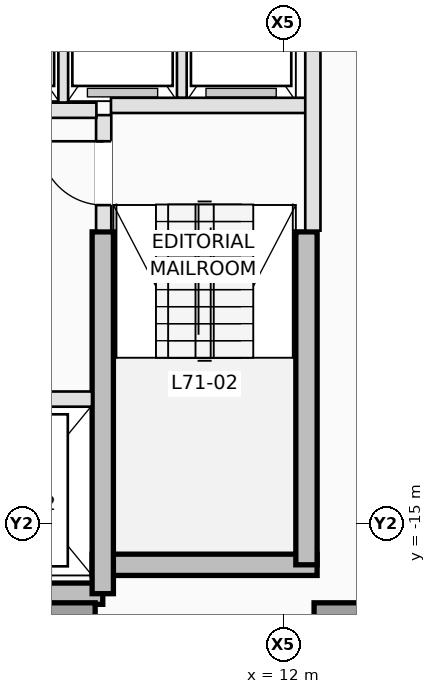
"""IFC4 building model, lengths in metres.
Left out: names, types, materials, properties, quantities, classifications, styles, units other than length and angle.
Written with IfcOpenShell. Run it as: python <this file> out.ifc"""

import sys

from ifc_helpers import new_model, si_unit, direction, frame, frame_2d, origin, origin_2d, place, context, subcontext, project, spatial, rectangle, extrude, element, fill, save


model = new_model("IFC4")
c1 = context("Model", 3, precision=1e-05, world=origin(), true_north=direction((0.0, 1.0)))
c2 = subcontext(c1, "Body", "Model", "MODEL_VIEW")
j1 = project(units=[si_unit("LENGTHUNIT", "METRE"), si_unit("PLANEANGLEUNIT", "RADIAN")], contexts=[c1])
p1 = place(None, origin())
s1 = spatial("IfcSite", under=j1, at=p1, CompositionType="ELEMENT")
p2 = place(p1, origin())
s2 = spatial("IfcBuilding", under=s1, at=p2, CompositionType="ELEMENT")
p3 = place(p2, frame((0.0, 0.0, 256.9)))
s3 = spatial("IfcBuildingStorey", under=s2, at=p3, CompositionType="ELEMENT", Elevation=256.9)
p4 = place(p3, frame((3.75, -16.15, 0.0), z_axis=(0.0, 0.0, 1.0), x_axis=(1.0, 0.0, 0.0)))
e1 = element("IfcWall", 1, at=p4, inside=s3, PredefinedType="SHEAR", context=c2, shape_type="SweptSolid", body=[
    extrude(rectangle(XDim=5.275, YDim=0.35, at=frame_2d((2.637, 0.0))), origin(), (0.0, 0.0, 1.0), 3.5),
])
p5 = place(p3, frame((8.85, -15.675, 0.0), z_axis=(0.0, 0.0, 1.0), x_axis=(1.0, 0.0, 0.0)))
e2 = element("IfcWall", 2, at=p5, inside=s3, PredefinedType="SHEAR", context=c2, shape_type="SweptSolid", body=[
    extrude(rectangle(XDim=3.7, YDim=0.35, at=frame_2d((1.85, 0.0))), origin(), (0.0, 0.0, 1.0), 3.5),
])
p6 = place(p3, frame((12.375, -15.675, 0.0), z_axis=(0.0, 0.0, 1.0), x_axis=(0.0, 1.0, 0.0)))
e3 = element("IfcWall", 3, at=p6, inside=s3, PredefinedType="SHEAR", context=c2, shape_type="SweptSolid", body=[
    extrude(rectangle(XDim=5.475, YDim=0.35, at=frame_2d((2.738, 0.0))), origin(), (0.0, 0.0, 1.0), 3.5),
])
p7 = place(p3, frame((9.025, -16.15, 0.0), z_axis=(0.0, 0.0, 1.0), x_axis=(0.0, 1.0, 0.0)))
e4 = element("IfcWall", 4, at=p7, inside=s3, PredefinedType="SHEAR", context=c2, shape_type="SweptSolid", body=[
    extrude(rectangle(XDim=5.95, YDim=0.35, at=frame_2d((2.975, 0.0))), origin(), (0.0, 0.0, 1.0), 3.5),
])
for number, where, z_axis, x_axis in (
    (5, (8.45, -16.75, 0.0), (0.0, 0.0, 1.0), (1.0, 0.0, 0.0)),
    (6, (12.95, -16.75, 0.0), (0.0, 0.0, 1.0), (1.0, 0.0, 0.0)),
):
    element("IfcColumn", number, at=place(p3, frame(where, z_axis=z_axis, x_axis=x_axis)), inside=s3, PredefinedType="COLUMN", context=c2, shape_type="SweptSolid", body=[
        extrude(rectangle(XDim=0.9, YDim=0.9, at=origin_2d()), origin(), (0.0, 0.0, 1.0), 3.5),
    ])
p8 = place(p3, frame((9.04, -10.18, 0.0), z_axis=(0.0, 0.0, 1.0), x_axis=(0.0, 1.0, 0.0)))
e7 = element("IfcWall", 7, at=p8, inside=s3, PredefinedType="PARTITIONING", context=c2, shape_type="SweptSolid", body=[
    extrude(rectangle(XDim=1.9, YDim=0.25, at=frame_2d((0.95, 0.0))), origin(), (0.0, 0.0, 1.0), 3.25),
])
p9 = place(p8, frame((0.42, 0.0, 0.0)))
e8 = element("IfcOpeningElement", 8, at=p9, cuts=e7, PredefinedType="OPENING", context=c2, shape_type="SweptSolid", body=[
    extrude(rectangle(XDim=1.05, YDim=2.15, at=frame_2d((0.525, 1.075))), frame((0.0, 0.135, 0.0), z_axis=(0.0, -1.0, 0.0), x_axis=(1.0, 0.0, 0.0)), (0.0, 0.0, 1.0), 0.27),
])
p10 = place(p3, frame((9.16, -8.12, 0.0), z_axis=(0.0, 0.0, 1.0), x_axis=(1.0, 0.0, 0.0)))
e9 = element("IfcWall", 9, at=p10, inside=s3, PredefinedType="PARTITIONING", context=c2, shape_type="SweptSolid", body=[
    extrude(rectangle(XDim=3.22, YDim=0.25, at=frame_2d((1.61, 0.0))), origin(), (0.0, 0.0, 1.0), 3.25),
])
p11 = place(p3, frame((12.48, -10.18, 0.0), z_axis=(0.0, 0.0, 1.0), x_axis=(0.0, 1.0, 0.0)))
e10 = element("IfcWall", 10, at=p11, inside=s3, PredefinedType="PARTITIONING", context=c2, shape_type="SweptSolid", body=[
    extrude(rectangle(XDim=4.84, YDim=0.25, at=frame_2d((2.42, 0.0))), origin(), (0.0, 0.0, 1.0), 3.25),
])
p12 = place(p3, frame((3.68, -12.95, 0.0), z_axis=(0.0, 0.0, 1.0), x_axis=(1.0, 0.0, 0.0)))
e11 = element("IfcWall", 11, at=p12, inside=s3, PredefinedType="PARTITIONING", context=c2, shape_type="SweptSolid", body=[
    extrude(rectangle(XDim=5.168, YDim=0.25, at=frame_2d((2.584, 0.0))), origin(), (0.0, 0.0, 1.0), 3.25),
])
p13 = place(p12, frame((3.32, 0.0, 0.0)))
e12 = element("IfcOpeningElement", 12, at=p13, cuts=e11, PredefinedType="OPENING", context=c2, shape_type="SweptSolid", body=[
    extrude(rectangle(XDim=1.1, YDim=2.15, at=frame_2d((0.55, 1.075))), frame((0.0, 0.135, 0.0), z_axis=(0.0, -1.0, 0.0), x_axis=(1.0, 0.0, 0.0)), (0.0, 0.0, 1.0), 0.27),
])
p14 = place(p12, frame((0.67, 0.0, 0.0)))
e13 = element("IfcOpeningElement", 13, at=p14, cuts=e11, PredefinedType="OPENING", context=c2, shape_type="SweptSolid", body=[
    extrude(rectangle(XDim=1.2, YDim=2.15, at=frame_2d((0.6, 1.075))), frame((0.0, 0.135, 0.0), z_axis=(0.0, -1.0, 0.0), x_axis=(1.0, 0.0, 0.0)), (0.0, 0.0, 1.0), 0.27),
])
p15 = place(p3, frame((3.68, -8.2, 0.0), z_axis=(0.0, 0.0, 1.0), x_axis=(1.0, 0.0, 0.0)))
e14 = element("IfcWall", 14, at=p15, inside=s3, PredefinedType="PARTITIONING", context=c2, shape_type="SweptSolid", body=[
    extrude(rectangle(XDim=5.24, YDim=0.25, at=frame_2d((2.62, 0.0))), origin(), (0.0, 0.0, 1.0), 3.25),
])
p16 = place(p3, frame((8.375, -8.073, 0.0), z_axis=(0.0, 0.0, 1.0), x_axis=(0.0, 1.0, 0.0)))
e15 = element("IfcWall", 15, at=p16, inside=s3, PredefinedType="PARTITIONING", context=c2, shape_type="SweptSolid", body=[
    extrude(rectangle(XDim=2.733, YDim=0.16, at=frame_2d((1.366, 0.0))), origin(), (0.0, 0.0, 1.0), 3.25),
])
p17 = place(p3, frame((10.325, -7.993, 0.0), z_axis=(0.0, 0.0, 1.0), x_axis=(0.0, 1.0, 0.0)))
e16 = element("IfcWall", 16, at=p17, inside=s3, PredefinedType="PARTITIONING", context=c2, shape_type="SweptSolid", body=[
    extrude(rectangle(XDim=2.653, YDim=0.16, at=frame_2d((1.326, 0.0))), origin(), (0.0, 0.0, 1.0), 3.25),
])
p18 = place(p9, origin())
e17 = element("IfcDoor", 17, at=p18, inside=s3, OperationType="SINGLE_SWING_RIGHT", PredefinedType="DOOR", context=c2, shape_type="SweptSolid", body=[
    extrude(rectangle(XDim=1.05, YDim=2.15, at=frame_2d((0.525, 1.075))), frame((0.0, 0.025, 0.0), z_axis=(0.0, -1.0, 0.0), x_axis=(1.0, 0.0, 0.0)), (0.0, 0.0, 1.0), 0.05),
])
fill(e8, e17)
save(model, sys.argv[1])
